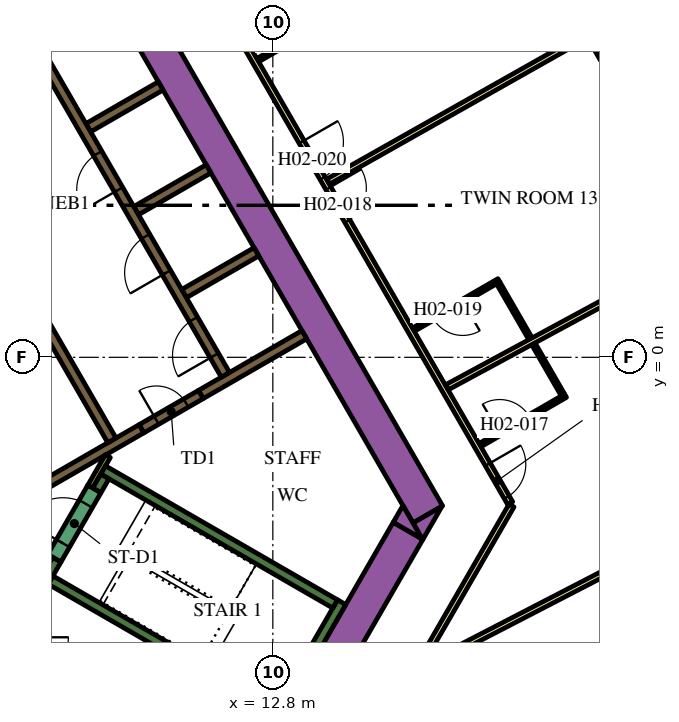
"""IFC4 building model, lengths in metres.
Left out: names, types, materials, properties, quantities, classifications, styles, units other than length and angle.
Written with IfcOpenShell. Run it as: python <this file> out.ifc"""

import sys

from ifc_helpers import new_model, si_unit, direction, frame, frame_2d, origin, origin_2d, place, context, subcontext, project, spatial, polyline, rectangle, outline, extrude, element, fill, save


model = new_model("IFC4")
c1 = context("Model", 3, precision=1e-05, world=origin(), true_north=direction((0.0, 1.0)))
c2 = subcontext(c1, "Body", "Model", "MODEL_VIEW")
j1 = project(units=[si_unit("LENGTHUNIT", "METRE"), si_unit("PLANEANGLEUNIT", "RADIAN")], contexts=[c1])
p1 = place(None, origin())
s1 = spatial("IfcSite", under=j1, at=p1, CompositionType="ELEMENT")
p2 = place(p1, origin())
s2 = spatial("IfcBuilding", under=s1, at=p2, CompositionType="ELEMENT")
p3 = place(p2, frame((0.0, 0.0, 47.1)))
s3 = spatial("IfcBuildingStorey", under=s2, at=p3, CompositionType="ELEMENT", Elevation=47.1)
p4 = place(p3, frame((21.443, 8.685, 0.0), z_axis=(0.0, 0.0, 1.0), x_axis=(-0.491973853463, 0.870609974391, 0.0)))
e1 = element("IfcColumn", 1, at=p4, inside=s3, PredefinedType="COLUMN", context=c2, shape_type="SweptSolid", body=[
    extrude(rectangle(XDim=1.4, YDim=0.9, at=origin_2d()), origin(), (0.0, 0.0, 1.0), 3.9),
])
p5 = place(p3, frame((6.776, 13.364, 0.0), z_axis=(0.0, 0.0, 1.0), x_axis=(0.500004177138, -0.8660229921, 0.0)))
e2 = element("IfcWall", 2, at=p5, inside=s3, PredefinedType="SOLIDWALL", context=c2, shape_type="SweptSolid", body=[
    extrude(rectangle(XDim=20.204, YDim=0.9, at=frame_2d((10.102, 0.0))), origin(), (0.0, 0.0, 1.0), 3.9),
])
p6 = place(p3, origin())
e3 = element("IfcWall", 3, at=p6, inside=s3, PredefinedType="SOLIDWALL", context=c2, shape_type="SweptSolid", body=[
    extrude(outline(polyline([(16.743, -4.8), (16.489, -4.36), (17.251, -3.92), (16.743, -4.8)])), origin(), (0.0, 0.0, 1.0), 3.9),
])
p7 = place(p3, frame((11.943, -12.214, 0.0), z_axis=(0.0, 0.0, 1.0), x_axis=(0.49998092645, 0.866036415623, 0.0)))
e4 = element("IfcWall", 4, at=p7, inside=s3, PredefinedType="SOLIDWALL", context=c2, shape_type="SweptSolid", body=[
    extrude(rectangle(XDim=8.83, YDim=0.9, at=frame_2d((4.415, 0.0))), origin(), (0.0, 0.0, 1.0), 3.9),
])
e5 = element("IfcWall", 5, at=p6, inside=s3, PredefinedType="SOLIDWALL", context=c2, shape_type="SweptSolid", body=[
    extrude(outline(polyline([(16.223, -3.9), (16.732, -4.78), (15.969, -4.34), (16.223, -3.9)])), origin(), (0.0, 0.0, 1.0), 3.9),
])
p8 = place(p3, frame((12.885, -9.431, 0.0), z_axis=(0.0, 0.0, 1.0), x_axis=(0.500020560727, 0.866013532718, 0.0)))
e6 = element("IfcWall", 6, at=p8, inside=s3, PredefinedType="SOLIDWALL", context=c2, shape_type="SweptSolid", body=[
    extrude(rectangle(XDim=3.45, YDim=0.25, at=frame_2d((1.725, 0.0))), origin(), (0.0, 0.0, 1.0), 3.9),
])
p9 = place(p3, frame((12.84, -9.261, 0.0), z_axis=(0.0, 0.0, 1.0), x_axis=(-0.866013990052, 0.500019768644, 0.0)))
e7 = element("IfcWall", 7, at=p9, inside=s3, PredefinedType="SOLIDWALL", context=c2, shape_type="SweptSolid", body=[
    extrude(rectangle(XDim=6.8, YDim=0.25, at=frame_2d((3.4, 0.0))), origin(), (0.0, 0.0, 1.0), 3.9),
])
p10 = place(p3, frame((6.78, -5.906, 0.0), z_axis=(0.0, 0.0, 1.0), x_axis=(0.500223362819, 0.865896406789, 0.0)))
e8 = element("IfcWall", 8, at=p10, inside=s3, PredefinedType="SOLIDWALL", context=c2, shape_type="SweptSolid", body=[
    extrude(rectangle(XDim=0.675, YDim=0.25, at=frame_2d((0.337, 0.0))), origin(), (0.0, 0.0, 1.0), 3.9),
])
p11 = place(p3, frame((8.334, -2.964, 0.0), z_axis=(0.0, 0.0, 1.0), x_axis=(0.866016039709, -0.500016218704, 0.0)))
e9 = element("IfcWall", 9, at=p11, inside=s3, PredefinedType="SOLIDWALL", context=c2, shape_type="SweptSolid", body=[
    extrude(rectangle(XDim=7.05, YDim=0.25, at=frame_2d((3.525, 0.0))), origin(), (0.0, 0.0, 1.0), 3.9),
])
p12 = place(p3, frame((8.168, -3.503, 0.0), z_axis=(0.0, 0.0, 1.0), x_axis=(0.49972245349, 0.866185586049, 0.0)))
e10 = element("IfcWall", 10, at=p12, inside=s3, PredefinedType="SOLIDWALL", context=c2, shape_type="SweptSolid", body=[
    extrude(rectangle(XDim=0.425, YDim=0.25, at=frame_2d((0.212, 0.0))), origin(), (0.0, 0.0, 1.0), 3.9),
])
p13 = place(p3, frame((10.464, 1.677, 0.0), z_axis=(0.0, 0.0, 1.0), x_axis=(0.86605622881, 0.499946605688, 0.0)))
e11 = element("IfcWall", 11, at=p13, inside=s3, PredefinedType="SOLIDWALL", context=c2, shape_type="SweptSolid", body=[
    extrude(rectangle(XDim=2.2, YDim=0.25, at=frame_2d((1.1, 0.0))), origin(), (0.0, 0.0, 1.0), 3.9),
])
p14 = place(p3, frame((13.629, 0.594, 0.0), z_axis=(0.0, 0.0, 1.0), x_axis=(-0.86602790099, -0.499995674689, 0.0)))
e12 = element("IfcWall", 12, at=p14, inside=s3, PredefinedType="SOLIDWALL", context=c2, shape_type="SweptSolid", body=[
    extrude(rectangle(XDim=3.146, YDim=0.25, at=frame_2d((1.573, 0.0))), origin(), (0.0, 0.0, 1.0), 3.9),
])
p15 = place(p3, frame((9.346, -1.879, 0.0), z_axis=(0.0, 0.0, 1.0), x_axis=(-0.866048528039, -0.499959945477, 0.0)))
e13 = element("IfcWall", 13, at=p15, inside=s3, PredefinedType="SOLIDWALL", context=c2, shape_type="SweptSolid", body=[
    extrude(rectangle(XDim=3.47, YDim=0.25, at=frame_2d((1.735, 0.0))), origin(), (0.0, 0.0, 1.0), 3.9),
])
for number, where, z_axis, x_axis in (
    (14, (9.204, 3.859, 0.0), (0.0, 0.0, 1.0), (0.866, 0.5, 0.0)),
    (15, (7.944, 6.041, 0.0), (0.0, 0.0, 1.0), (0.866, 0.5, 0.0)),
):
    element("IfcWall", number, at=place(p3, frame(where, z_axis=z_axis, x_axis=x_axis)), inside=s3, PredefinedType="SOLIDWALL", context=c2, shape_type="SweptSolid", body=[
        extrude(rectangle(XDim=2.2, YDim=0.25, at=frame_2d((1.1, 0.0))), origin(), (0.0, 0.0, 1.0), 3.9),
    ])
p16 = place(p3, frame((6.945, -5.222, 0.0), z_axis=(0.0, 0.0, 1.0), x_axis=(-0.499818422106, -0.866130212453, 0.0)))
e16 = element("IfcWall", 16, at=p16, inside=s3, PredefinedType="PARTITIONING", context=c2, shape_type="SweptSolid", body=[
    extrude(rectangle(XDim=0.514, YDim=0.15, at=frame_2d((0.257, 0.0))), origin(), (0.0, 0.0, 1.0), 2.75),
])
p17 = place(p3, frame((8.459, -2.599, 0.0), z_axis=(0.0, 0.0, 1.0), x_axis=(-0.500041054325, -0.866001699761, 0.0)))
e17 = element("IfcWall", 17, at=p17, inside=s3, PredefinedType="PARTITIONING", context=c2, shape_type="SweptSolid", body=[
    extrude(rectangle(XDim=0.929, YDim=0.15, at=frame_2d((0.464, 0.0))), origin(), (0.0, 0.0, 1.0), 3.9),
])
p18 = place(p3, frame((11.553, -0.46, 0.0), z_axis=(0.0, 0.0, 1.0), x_axis=(-0.500006514828, 0.866021642414, 0.0)))
e18 = element("IfcWall", 18, at=p18, inside=s3, PredefinedType="SOLIDWALL", context=c2, shape_type="SweptSolid", body=[
    extrude(rectangle(XDim=12.35, YDim=0.25, at=frame_2d((6.175, 0.0))), origin(), (0.0, 0.0, 1.0), 3.9),
])
p19 = place(p18, frame((0.585, 0.0, 0.0)))
e19 = element("IfcOpeningElement", 19, at=p19, cuts=e18, PredefinedType="OPENING", context=c2, shape_type="SweptSolid", body=[
    extrude(rectangle(XDim=1.1, YDim=2.1, at=frame_2d((0.55, 1.05))), frame((0.0, 0.135, 0.0), z_axis=(0.0, -1.0, 0.0), x_axis=(1.0, 0.0, 0.0)), (0.0, 0.0, 1.0), 0.27),
])
p20 = place(p18, frame((3.105, 0.0, 0.0)))
e20 = element("IfcOpeningElement", 20, at=p20, cuts=e18, PredefinedType="OPENING", context=c2, shape_type="SweptSolid", body=[
    extrude(rectangle(XDim=1.1, YDim=2.1, at=frame_2d((0.55, 1.05))), frame((0.0, 0.135, 0.0), z_axis=(0.0, -1.0, 0.0), x_axis=(1.0, 0.0, 0.0)), (0.0, 0.0, 1.0), 0.27),
])
p21 = place(p18, frame((5.625, 0.0, 0.0)))
e21 = element("IfcOpeningElement", 21, at=p21, cuts=e18, PredefinedType="OPENING", context=c2, shape_type="SweptSolid", body=[
    extrude(rectangle(XDim=1.1, YDim=2.1, at=frame_2d((0.55, 1.05))), frame((0.0, 0.135, 0.0), z_axis=(0.0, -1.0, 0.0), x_axis=(1.0, 0.0, 0.0)), (0.0, 0.0, 1.0), 0.27),
])
p22 = place(p3, frame((8.565, -2.185, 0.0), z_axis=(0.0, 0.0, 1.0), x_axis=(-0.499997954832, 0.866026584559, 0.0)))
e22 = element("IfcWall", 22, at=p22, inside=s3, PredefinedType="SOLIDWALL", context=c2, shape_type="SweptSolid", body=[
    extrude(rectangle(XDim=12.35, YDim=0.25, at=frame_2d((6.175, 0.0))), origin(), (0.0, 0.0, 1.0), 3.9),
])
p23 = place(p22, frame((5.725, 0.0, 0.0)))
e23 = element("IfcOpeningElement", 23, at=p23, cuts=e22, PredefinedType="OPENING", context=c2, shape_type="SweptSolid", body=[
    extrude(rectangle(XDim=0.9, YDim=2.1, at=frame_2d((0.45, 1.05))), frame((0.0, 0.135, 0.0), z_axis=(0.0, -1.0, 0.0), x_axis=(1.0, 0.0, 0.0)), (0.0, 0.0, 1.0), 0.27),
])
p24 = place(p3, frame((7.053, -5.284, 0.0), z_axis=(0.0, 0.0, 1.0), x_axis=(0.500078061341, 0.865980330357, 0.0)))
e24 = element("IfcWall", 24, at=p24, inside=s3, PredefinedType="SOLIDWALL", context=c2, shape_type="SweptSolid", body=[
    extrude(rectangle(XDim=2.1, YDim=0.4, at=frame_2d((1.05, 0.0))), origin(), (0.0, 0.0, 1.0), 3.9),
])
p25 = place(p24, frame((0.45, 0.0, 0.0)))
e25 = element("IfcOpeningElement", 25, at=p25, cuts=e24, PredefinedType="OPENING", context=c2, shape_type="SweptSolid", body=[
    extrude(rectangle(XDim=1.2, YDim=2.1, at=frame_2d((0.6, 1.05))), frame((0.0, 0.21, 0.0), z_axis=(0.0, -1.0, 0.0), x_axis=(1.0, 0.0, 0.0)), (0.0, 0.0, 1.0), 0.42),
])
p26 = place(p3, frame((9.346, -1.879, 0.0), z_axis=(0.0, 0.0, 1.0), x_axis=(0.866047807691, 0.499961193289, 0.0)))
e26 = element("IfcWall", 26, at=p26, inside=s3, PredefinedType="SOLIDWALL", context=c2, shape_type="SweptSolid", body=[
    extrude(rectangle(XDim=1.8, YDim=0.25, at=frame_2d((0.9, 0.0))), origin(), (0.0, 0.0, 1.0), 3.9),
])
p27 = place(p26, frame((0.45, 0.0, 0.0)))
e27 = element("IfcOpeningElement", 27, at=p27, cuts=e26, PredefinedType="OPENING", context=c2, shape_type="SweptSolid", body=[
    extrude(rectangle(XDim=0.9, YDim=2.1, at=frame_2d((0.45, 1.05))), frame((0.0, 0.135, 0.0), z_axis=(0.0, -1.0, 0.0), x_axis=(1.0, 0.0, 0.0)), (0.0, 0.0, 1.0), 0.27),
])
p28 = place(p3, frame((19.081, -3.9, 0.0), z_axis=(0.0, 0.0, 1.0), x_axis=(-0.499974327079, -0.866040225545, 0.0)))
e28 = element("IfcWall", 28, at=p28, inside=s3, PredefinedType="PARTITIONING", context=c2, shape_type="SweptSolid", body=[
    extrude(rectangle(XDim=5.258, YDim=0.15, at=frame_2d((2.629, 0.0))), origin(), (0.0, 0.0, 1.0), 2.75),
])
p29 = place(p3, frame((6.163, 18.475, 0.0), z_axis=(0.0, 0.0, 1.0), x_axis=(0.500001317485, -0.866024643133, 0.0)))
e29 = element("IfcWall", 29, at=p29, inside=s3, PredefinedType="PARTITIONING", context=c2, shape_type="SweptSolid", body=[
    extrude(rectangle(XDim=25.767, YDim=0.15, at=frame_2d((12.883, 0.0))), origin(), (0.0, 0.0, 1.0), 2.75),
])
p30 = place(p29, frame((24.586, 0.0, 0.0)))
e30 = element("IfcOpeningElement", 30, at=p30, cuts=e29, PredefinedType="OPENING", context=c2, shape_type="SweptSolid", body=[
    extrude(rectangle(XDim=1.0, YDim=2.1, at=frame_2d((0.5, 1.05))), frame((0.0, 0.085, 0.0), z_axis=(0.0, -1.0, 0.0), x_axis=(1.0, 0.0, 0.0)), (0.0, 0.0, 1.0), 0.17),
])
p31 = place(p29, frame((16.196, 0.0, 0.0)))
e31 = element("IfcOpeningElement", 31, at=p31, cuts=e29, PredefinedType="OPENING", context=c2, shape_type="SweptSolid", body=[
    extrude(rectangle(XDim=1.0, YDim=2.1, at=frame_2d((0.5, 1.05))), frame((0.0, 0.085, 0.0), z_axis=(0.0, -1.0, 0.0), x_axis=(1.0, 0.0, 0.0)), (0.0, 0.0, 1.0), 0.17),
])
p32 = place(p29, frame((14.789, 0.0, 0.0)))
e32 = element("IfcOpeningElement", 32, at=p32, cuts=e29, PredefinedType="OPENING", context=c2, shape_type="SweptSolid", body=[
    extrude(rectangle(XDim=1.1, YDim=2.1, at=frame_2d((0.55, 1.05))), frame((0.0, 0.085, 0.0), z_axis=(0.0, -1.0, 0.0), x_axis=(1.0, 0.0, 0.0)), (0.0, 0.0, 1.0), 0.17),
])
p33 = place(p29, frame((3.698, 0.0, 0.0)))
e33 = element("IfcOpeningElement", 33, at=p33, cuts=e29, PredefinedType="OPENING", context=c2, shape_type="SweptSolid", body=[
    extrude(rectangle(XDim=1.0, YDim=2.1, at=frame_2d((0.5, 1.05))), frame((0.0, 0.085, 0.0), z_axis=(0.0, -1.0, 0.0), x_axis=(1.0, 0.0, 0.0)), (0.0, 0.0, 1.0), 0.17),
])
p34 = place(p29, frame((2.391, 0.0, 0.0)))
e34 = element("IfcOpeningElement", 34, at=p34, cuts=e29, PredefinedType="OPENING", context=c2, shape_type="SweptSolid", body=[
    extrude(rectangle(XDim=1.0, YDim=2.1, at=frame_2d((0.5, 1.05))), frame((0.0, 0.085, 0.0), z_axis=(0.0, -1.0, 0.0), x_axis=(1.0, 0.0, 0.0)), (0.0, 0.0, 1.0), 0.17),
])
p35 = place(p3, frame((21.052, 8.464, 0.0), z_axis=(0.0, 0.0, 1.0), x_axis=(-0.87059371954, -0.492002617368, 0.0)))
e35 = element("IfcWall", 35, at=p35, inside=s3, PredefinedType="PARTITIONING", context=c2, shape_type="SweptSolid", body=[
    extrude(rectangle(XDim=7.803, YDim=0.15, at=frame_2d((3.902, 0.0))), origin(), (0.0, 0.0, 1.0), 2.75),
])
p36 = place(p3, frame((27.134, -2.779, 0.0), z_axis=(0.0, 0.0, 1.0), x_axis=(-0.8882049501, -0.459447457951, 0.0)))
e36 = element("IfcWall", 36, at=p36, inside=s3, PredefinedType="PARTITIONING", context=c2, shape_type="SweptSolid", body=[
    extrude(rectangle(XDim=11.638, YDim=0.15, at=frame_2d((5.819, 0.0))), origin(), (0.0, 0.0, 1.0), 2.75),
])
p37 = place(p3, frame((24.145, 2.871, 0.0), z_axis=(0.0, 0.0, 1.0), x_axis=(-0.879551725039, -0.475803281809, 0.0)))
e37 = element("IfcWall", 37, at=p37, inside=s3, PredefinedType="PARTITIONING", context=c2, shape_type="SweptSolid", body=[
    extrude(rectangle(XDim=7.688, YDim=0.15, at=frame_2d((3.844, 0.0))), origin(), (0.0, 0.0, 1.0), 2.75),
])
p38 = place(p3, frame((18.25, -2.311, 0.0), z_axis=(0.0, 0.0, 1.0), x_axis=(0.866021400173, 0.500006934395, 0.0)))
e38 = element("IfcWall", 38, at=p38, inside=s3, PredefinedType="PARTITIONING", context=c2, shape_type="SweptSolid", body=[
    extrude(rectangle(XDim=2.6, YDim=0.1, at=frame_2d((1.3, 0.0))), origin(), (0.0, 0.0, 1.0), 2.75),
])
p39 = place(p38, frame((0.6, 0.0, 0.0)))
e39 = element("IfcOpeningElement", 39, at=p39, cuts=e38, PredefinedType="OPENING", context=c2, shape_type="SweptSolid", body=[
    extrude(rectangle(XDim=0.9, YDim=2.1, at=frame_2d((0.45, 1.05))), frame((0.0, 0.06, 0.0), z_axis=(0.0, -1.0, 0.0), x_axis=(1.0, 0.0, 0.0)), (0.0, 0.0, 1.0), 0.12),
])
p40 = place(p3, frame((20.434, -0.993, 0.0), z_axis=(0.0, 0.0, 1.0), x_axis=(-0.500086022567, 0.865975732936, 0.0)))
e40 = element("IfcWall", 40, at=p40, inside=s3, PredefinedType="PARTITIONING", context=c2, shape_type="SweptSolid", body=[
    extrude(rectangle(XDim=1.55, YDim=0.1, at=frame_2d((0.775, 0.0))), origin(), (0.0, 0.0, 1.0), 2.75),
])
p41 = place(p3, frame((18.749, 2.026, 0.0), z_axis=(0.0, 0.0, 1.0), x_axis=(-0.866021400173, -0.500006934395, 0.0)))
e41 = element("IfcWall", 41, at=p41, inside=s3, PredefinedType="PARTITIONING", context=c2, shape_type="SweptSolid", body=[
    extrude(rectangle(XDim=2.6, YDim=0.1, at=frame_2d((1.3, 0.0))), origin(), (0.0, 0.0, 1.0), 2.75),
])
p42 = place(p41, frame((1.1, 0.0, 0.0)))
e42 = element("IfcOpeningElement", 42, at=p42, cuts=e41, PredefinedType="OPENING", context=c2, shape_type="SweptSolid", body=[
    extrude(rectangle(XDim=0.9, YDim=2.1, at=frame_2d((0.45, 1.05))), frame((0.0, 0.06, 0.0), z_axis=(0.0, -1.0, 0.0), x_axis=(1.0, 0.0, 0.0)), (0.0, 0.0, 1.0), 0.12),
])
p43 = place(p3, frame((18.731, 1.958, 0.0), z_axis=(0.0, 0.0, 1.0), x_axis=(0.499976720371, -0.866038843867, 0.0)))
e43 = element("IfcWall", 43, at=p43, inside=s3, PredefinedType="PARTITIONING", context=c2, shape_type="SweptSolid", body=[
    extrude(rectangle(XDim=1.69, YDim=0.1, at=frame_2d((0.845, 0.0))), origin(), (0.0, 0.0, 1.0), 2.75),
])
p44 = place(p3, frame((12.402, 7.819, 0.0), z_axis=(0.0, 0.0, 1.0), x_axis=(0.866034573852, 0.49998411664, 0.0)))
e44 = element("IfcWall", 44, at=p44, inside=s3, PredefinedType="PARTITIONING", context=c2, shape_type="SweptSolid", body=[
    extrude(rectangle(XDim=2.8, YDim=0.1, at=frame_2d((1.4, 0.0))), origin(), (0.0, 0.0, 1.0), 2.75),
])
p45 = place(p44, frame((0.55, 0.0, 0.0)))
e45 = element("IfcOpeningElement", 45, at=p45, cuts=e44, PredefinedType="OPENING", context=c2, shape_type="SweptSolid", body=[
    extrude(rectangle(XDim=1.0, YDim=2.1, at=frame_2d((0.5, 1.05))), frame((0.0, 0.06, 0.0), z_axis=(0.0, -1.0, 0.0), x_axis=(1.0, 0.0, 0.0)), (0.0, 0.0, 1.0), 0.12),
])
p46 = place(p19, origin())
e46 = element("IfcDoor", 46, at=p46, inside=s3, OperationType="DOUBLE_DOOR_SLIDING", PredefinedType="DOOR", context=c2, shape_type="SweptSolid", body=[
    extrude(rectangle(XDim=1.1, YDim=2.1, at=frame_2d((0.55, 1.05))), frame((0.0, 0.025, 0.0), z_axis=(0.0, -1.0, 0.0), x_axis=(1.0, 0.0, 0.0)), (0.0, 0.0, 1.0), 0.05),
])
fill(e19, e46)
p47 = place(p20, origin())
e47 = element("IfcDoor", 47, at=p47, inside=s3, OperationType="DOUBLE_DOOR_SLIDING", PredefinedType="DOOR", context=c2, shape_type="SweptSolid", body=[
    extrude(rectangle(XDim=1.1, YDim=2.1, at=frame_2d((0.55, 1.05))), frame((0.0, 0.025, 0.0), z_axis=(0.0, -1.0, 0.0), x_axis=(1.0, 0.0, 0.0)), (0.0, 0.0, 1.0), 0.05),
])
fill(e20, e47)
p48 = place(p21, origin())
e48 = element("IfcDoor", 48, at=p48, inside=s3, OperationType="DOUBLE_DOOR_SLIDING", PredefinedType="DOOR", context=c2, shape_type="SweptSolid", body=[
    extrude(rectangle(XDim=1.1, YDim=2.1, at=frame_2d((0.55, 1.05))), frame((0.0, 0.025, 0.0), z_axis=(0.0, -1.0, 0.0), x_axis=(1.0, 0.0, 0.0)), (0.0, 0.0, 1.0), 0.05),
])
fill(e21, e48)
p49 = place(p25, origin())
e49 = element("IfcDoor", 49, at=p49, inside=s3, OperationType="SINGLE_SWING_LEFT", PredefinedType="DOOR", context=c2, shape_type="SweptSolid", body=[
    extrude(rectangle(XDim=1.2, YDim=2.1, at=frame_2d((0.6, 1.05))), frame((0.0, 0.025, 0.0), z_axis=(0.0, -1.0, 0.0), x_axis=(1.0, 0.0, 0.0)), (0.0, 0.0, 1.0), 0.05),
])
fill(e25, e49)
p50 = place(p27, origin())
e50 = element("IfcDoor", 50, at=p50, inside=s3, OperationType="SINGLE_SWING_LEFT", PredefinedType="DOOR", context=c2, shape_type="SweptSolid", body=[
    extrude(rectangle(XDim=0.9, YDim=2.1, at=frame_2d((0.45, 1.05))), frame((0.0, 0.025, 0.0), z_axis=(0.0, -1.0, 0.0), x_axis=(1.0, 0.0, 0.0)), (0.0, 0.0, 1.0), 0.05),
])
fill(e27, e50)
p51 = place(p30, origin())
e51 = element("IfcDoor", 51, at=p51, inside=s3, OperationType="SINGLE_SWING_RIGHT", PredefinedType="DOOR", context=c2, shape_type="SweptSolid", body=[
    extrude(rectangle(XDim=1.0, YDim=2.1, at=frame_2d((0.5, 1.05))), frame((0.0, 0.025, 0.0), z_axis=(0.0, -1.0, 0.0), x_axis=(1.0, 0.0, 0.0)), (0.0, 0.0, 1.0), 0.05),
])
fill(e30, e51)
p52 = place(p39, origin())
e52 = element("IfcDoor", 52, at=p52, inside=s3, OperationType="SINGLE_SWING_RIGHT", PredefinedType="DOOR", context=c2, shape_type="SweptSolid", body=[
    extrude(rectangle(XDim=0.9, YDim=2.1, at=frame_2d((0.45, 1.05))), frame((0.0, 0.025, 0.0), z_axis=(0.0, -1.0, 0.0), x_axis=(1.0, 0.0, 0.0)), (0.0, 0.0, 1.0), 0.05),
])
fill(e39, e52)
p53 = place(p31, origin())
e53 = element("IfcDoor", 53, at=p53, inside=s3, OperationType="SINGLE_SWING_LEFT", PredefinedType="DOOR", context=c2, shape_type="SweptSolid", body=[
    extrude(rectangle(XDim=1.0, YDim=2.1, at=frame_2d((0.5, 1.05))), frame((0.0, 0.025, 0.0), z_axis=(0.0, -1.0, 0.0), x_axis=(1.0, 0.0, 0.0)), (0.0, 0.0, 1.0), 0.05),
])
fill(e31, e53)
p54 = place(p42, origin())
e54 = element("IfcDoor", 54, at=p54, inside=s3, OperationType="SINGLE_SWING_LEFT", PredefinedType="DOOR", context=c2, shape_type="SweptSolid", body=[
    extrude(rectangle(XDim=0.9, YDim=2.1, at=frame_2d((0.45, 1.05))), frame((0.0, 0.025, 0.0), z_axis=(0.0, -1.0, 0.0), x_axis=(1.0, 0.0, 0.0)), (0.0, 0.0, 1.0), 0.05),
])
fill(e42, e54)
p55 = place(p32, origin())
e55 = element("IfcDoor", 55, at=p55, inside=s3, OperationType="SINGLE_SWING_RIGHT", PredefinedType="DOOR", context=c2, shape_type="SweptSolid", body=[
    extrude(rectangle(XDim=1.1, YDim=2.1, at=frame_2d((0.55, 1.05))), frame((0.0, 0.025, 0.0), z_axis=(0.0, -1.0, 0.0), x_axis=(1.0, 0.0, 0.0)), (0.0, 0.0, 1.0), 0.05),
])
fill(e32, e55)
save(model, sys.argv[1])
